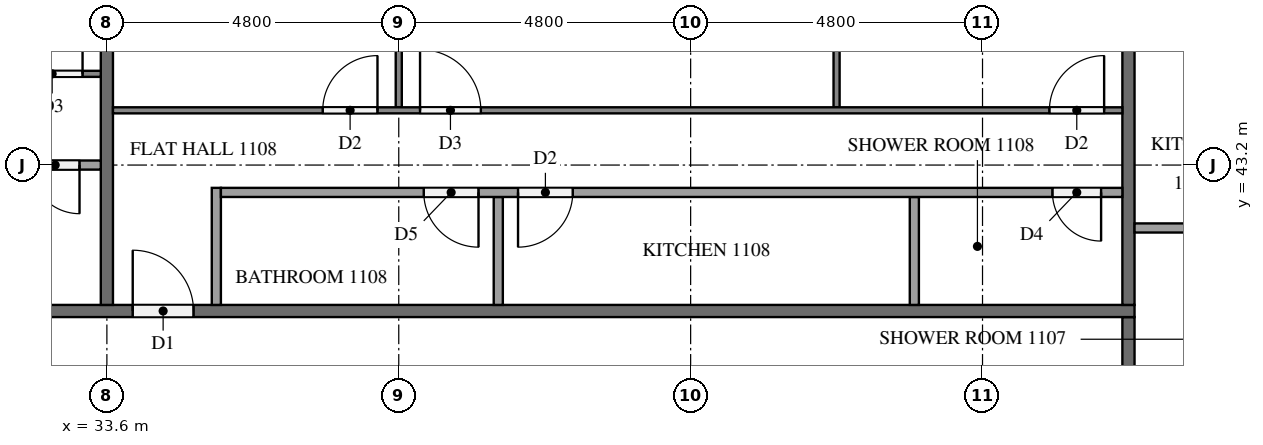
"""IFC4 building model, lengths in metres.
Left out: names, types, materials, properties, quantities, classifications, styles, units other than length and angle.
Written with IfcOpenShell. Run it as: python <this file> out.ifc"""

import sys

from ifc_helpers import new_model, si_unit, direction, frame, frame_2d, origin, place, context, subcontext, project, spatial, rectangle, extrude, element, fill, save


model = new_model("IFC4")
c1 = context("Model", 3, precision=1e-05, world=origin(), true_north=direction((0.0, 1.0)))
c2 = subcontext(c1, "Body", "Model", "MODEL_VIEW")
j1 = project(units=[si_unit("LENGTHUNIT", "METRE"), si_unit("PLANEANGLEUNIT", "RADIAN")], contexts=[c1])
p1 = place(None, origin())
s1 = spatial("IfcSite", under=j1, at=p1, CompositionType="ELEMENT")
p2 = place(p1, origin())
s2 = spatial("IfcBuilding", under=s1, at=p2, CompositionType="ELEMENT")
p3 = place(p2, frame((0.0, 0.0, 46.9)))
s3 = spatial("IfcBuildingStorey", under=s2, at=p3, CompositionType="ELEMENT", Elevation=46.9)
p4 = place(p3, frame((50.4, 40.7, 0.0), z_axis=(0.0, 0.0, 1.0), x_axis=(0.0, -1.0, 0.0)))
e1 = element("IfcWall", 1, at=p4, inside=s3, PredefinedType="PARTITIONING", context=c2, shape_type="SweptSolid", body=[
    extrude(rectangle(XDim=28.6, YDim=0.2, at=frame_2d((14.3, 0.0))), origin(), (0.0, 0.0, 1.0), 3.2),
])
p5 = place(p4, frame((17.125, 0.0, 0.0)))
e2 = element("IfcOpeningElement", 2, at=p5, cuts=e1, PredefinedType="OPENING", context=c2, shape_type="SweptSolid", body=[
    extrude(rectangle(XDim=1.0, YDim=2.1, at=frame_2d((0.5, 1.05))), frame((0.0, 0.11, 0.0), z_axis=(0.0, -1.0, 0.0), x_axis=(1.0, 0.0, 0.0)), (0.0, 0.0, 1.0), 0.22),
])
p6 = place(p4, frame((15.275, 0.0, 0.0)))
e3 = element("IfcOpeningElement", 3, at=p6, cuts=e1, PredefinedType="OPENING", context=c2, shape_type="SweptSolid", body=[
    extrude(rectangle(XDim=1.0, YDim=2.1, at=frame_2d((0.5, 1.05))), frame((0.0, 0.11, 0.0), z_axis=(0.0, -1.0, 0.0), x_axis=(1.0, 0.0, 0.0)), (0.0, 0.0, 1.0), 0.22),
])
p7 = place(p4, frame((5.675, 0.0, 0.0)))
e4 = element("IfcOpeningElement", 4, at=p7, cuts=e1, PredefinedType="OPENING", context=c2, shape_type="SweptSolid", body=[
    extrude(rectangle(XDim=1.0, YDim=2.1, at=frame_2d((0.5, 1.05))), frame((0.0, 0.11, 0.0), z_axis=(0.0, -1.0, 0.0), x_axis=(1.0, 0.0, 0.0)), (0.0, 0.0, 1.0), 0.22),
])
p8 = place(p3, frame((11.9, 40.8, 0.0), z_axis=(0.0, 0.0, 1.0), x_axis=(1.0, 0.0, 0.0)))
e5 = element("IfcWall", 5, at=p8, inside=s3, PredefinedType="PARTITIONING", context=c2, shape_type="SweptSolid", body=[
    extrude(rectangle(XDim=38.6, YDim=0.2, at=frame_2d((19.3, 0.0))), origin(), (0.0, 0.0, 1.0), 3.2),
])
p9 = place(p8, frame((22.125, 0.0, 0.0)))
e6 = element("IfcOpeningElement", 6, at=p9, cuts=e5, PredefinedType="OPENING", context=c2, shape_type="SweptSolid", body=[
    extrude(rectangle(XDim=1.0, YDim=2.1, at=frame_2d((0.5, 1.05))), frame((0.0, 0.11, 0.0), z_axis=(0.0, -1.0, 0.0), x_axis=(1.0, 0.0, 0.0)), (0.0, 0.0, 1.0), 0.22),
])
p10 = place(p8, frame((10.125, 0.0, 0.0)))
e7 = element("IfcOpeningElement", 7, at=p10, cuts=e5, PredefinedType="OPENING", context=c2, shape_type="SweptSolid", body=[
    extrude(rectangle(XDim=1.0, YDim=2.1, at=frame_2d((0.5, 1.05))), frame((0.0, 0.11, 0.0), z_axis=(0.0, -1.0, 0.0), x_axis=(1.0, 0.0, 0.0)), (0.0, 0.0, 1.0), 0.22),
])
p11 = place(p8, frame((8.275, 0.0, 0.0)))
e8 = element("IfcOpeningElement", 8, at=p11, cuts=e5, PredefinedType="OPENING", context=c2, shape_type="SweptSolid", body=[
    extrude(rectangle(XDim=1.0, YDim=2.1, at=frame_2d((0.5, 1.05))), frame((0.0, 0.11, 0.0), z_axis=(0.0, -1.0, 0.0), x_axis=(1.0, 0.0, 0.0)), (0.0, 0.0, 1.0), 0.22),
])
p12 = place(p3, frame((50.4, 40.9, 0.0), z_axis=(0.0, 0.0, 1.0), x_axis=(0.0, 1.0, 0.0)))
e9 = element("IfcWall", 9, at=p12, inside=s3, PredefinedType="PARTITIONING", context=c2, shape_type="SweptSolid", body=[
    extrude(rectangle(XDim=7.0, YDim=0.2, at=frame_2d((3.5, 0.0))), origin(), (0.0, 0.0, 1.0), 3.2),
])
p13 = place(p3, frame((33.6, 47.55, 0.0), z_axis=(0.0, 0.0, 1.0), x_axis=(0.0, -1.0, 0.0)))
e10 = element("IfcWall", 10, at=p13, inside=s3, PredefinedType="PARTITIONING", context=c2, shape_type="SweptSolid", body=[
    extrude(rectangle(XDim=6.65, YDim=0.2, at=frame_2d((3.325, 0.0))), origin(), (0.0, 0.0, 1.0), 3.2),
])
p14 = place(p3, frame((50.5, 42.165, 0.0), z_axis=(0.0, 0.0, 1.0), x_axis=(1.0, 0.0, 0.0)))
e11 = element("IfcWall", 11, at=p14, inside=s3, PredefinedType="PARTITIONING", context=c2, shape_type="SweptSolid", body=[
    extrude(rectangle(XDim=1.925, YDim=0.15, at=frame_2d((0.962, 0.0))), origin(), (0.0, 0.0, 1.0), 3.2),
])
for number, where, z_axis, x_axis in (
    (12, (38.4, 44.15, 0.0), (0.0, 0.0, 1.0), (0.0, 1.0, 0.0)),
    (13, (45.6, 44.15, 0.0), (0.0, 0.0, 1.0), (0.0, 1.0, 0.0)),
):
    element("IfcWall", number, at=place(p3, frame(where, z_axis=z_axis, x_axis=x_axis)), inside=s3, PredefinedType="PARTITIONING", context=c2, shape_type="SweptSolid", body=[
        extrude(rectangle(XDim=3.75, YDim=0.1, at=frame_2d((1.875, 0.0))), origin(), (0.0, 0.0, 1.0), 3.2),
    ])
p15 = place(p3, frame((33.7, 44.1, 0.0), z_axis=(0.0, 0.0, 1.0), x_axis=(1.0, 0.0, 0.0)))
e14 = element("IfcWall", 14, at=p15, inside=s3, PredefinedType="PARTITIONING", context=c2, shape_type="SweptSolid", body=[
    extrude(rectangle(XDim=16.6, YDim=0.1, at=frame_2d((8.3, 0.0))), origin(), (0.0, 0.0, 1.0), 3.2),
])
p16 = place(p15, frame((3.45, 0.0, 0.0)))
e15 = element("IfcOpeningElement", 15, at=p16, cuts=e14, PredefinedType="OPENING", context=c2, shape_type="SweptSolid", body=[
    extrude(rectangle(XDim=0.9, YDim=2.1, at=frame_2d((0.45, 1.05))), frame((0.0, 0.06, 0.0), z_axis=(0.0, -1.0, 0.0), x_axis=(1.0, 0.0, 0.0)), (0.0, 0.0, 1.0), 0.12),
])
p17 = place(p15, frame((5.05, 0.0, 0.0)))
e16 = element("IfcOpeningElement", 16, at=p17, cuts=e14, PredefinedType="OPENING", context=c2, shape_type="SweptSolid", body=[
    extrude(rectangle(XDim=1.0, YDim=2.1, at=frame_2d((0.5, 1.05))), frame((0.0, 0.06, 0.0), z_axis=(0.0, -1.0, 0.0), x_axis=(1.0, 0.0, 0.0)), (0.0, 0.0, 1.0), 0.12),
])
p18 = place(p15, frame((15.4, 0.0, 0.0)))
e17 = element("IfcOpeningElement", 17, at=p18, cuts=e14, PredefinedType="OPENING", context=c2, shape_type="SweptSolid", body=[
    extrude(rectangle(XDim=0.9, YDim=2.1, at=frame_2d((0.45, 1.05))), frame((0.0, 0.06, 0.0), z_axis=(0.0, -1.0, 0.0), x_axis=(1.0, 0.0, 0.0)), (0.0, 0.0, 1.0), 0.12),
])
for number, where, z_axis, x_axis in (
    (18, (40.037, 40.9, 0.0), (0.0, 0.0, 1.0), (0.0, 1.0, 0.0)),
    (19, (46.879, 40.9, 0.0), (0.0, 0.0, 1.0), (0.0, 1.0, 0.0)),
):
    element("IfcWall", number, at=place(p3, frame(where, z_axis=z_axis, x_axis=x_axis)), inside=s3, PredefinedType="PARTITIONING", context=c2, shape_type="SweptSolid", body=[
        extrude(rectangle(XDim=1.775, YDim=0.15, at=frame_2d((0.888, 0.0))), origin(), (0.0, 0.0, 1.0), 3.2),
    ])
p19 = place(p3, frame((35.4, 40.9, 0.0), z_axis=(0.0, 0.0, 1.0), x_axis=(0.0, 1.0, 0.0)))
e20 = element("IfcWall", 20, at=p19, inside=s3, PredefinedType="PARTITIONING", context=c2, shape_type="SweptSolid", body=[
    extrude(rectangle(XDim=1.925, YDim=0.15, at=frame_2d((0.962, 0.0))), origin(), (0.0, 0.0, 1.0), 3.2),
])
p20 = place(p3, frame((50.3, 42.75, 0.0), z_axis=(0.0, 0.0, 1.0), x_axis=(-1.0, 0.0, 0.0)))
e21 = element("IfcWall", 21, at=p20, inside=s3, PredefinedType="PARTITIONING", context=c2, shape_type="SweptSolid", body=[
    extrude(rectangle(XDim=14.825, YDim=0.15, at=frame_2d((7.413, 0.0))), origin(), (0.0, 0.0, 1.0), 3.2),
])
p21 = place(p20, frame((10.588, 0.0, 0.0)))
e22 = element("IfcOpeningElement", 22, at=p21, cuts=e21, PredefinedType="OPENING", context=c2, shape_type="SweptSolid", body=[
    extrude(rectangle(XDim=0.9, YDim=2.1, at=frame_2d((0.45, 1.05))), frame((0.0, 0.085, 0.0), z_axis=(0.0, -1.0, 0.0), x_axis=(1.0, 0.0, 0.0)), (0.0, 0.0, 1.0), 0.17),
])
p22 = place(p20, frame((9.039, 0.0, 0.0)))
e23 = element("IfcOpeningElement", 23, at=p22, cuts=e21, PredefinedType="OPENING", context=c2, shape_type="SweptSolid", body=[
    extrude(rectangle(XDim=0.9, YDim=2.1, at=frame_2d((0.45, 1.05))), frame((0.0, 0.085, 0.0), z_axis=(0.0, -1.0, 0.0), x_axis=(1.0, 0.0, 0.0)), (0.0, 0.0, 1.0), 0.17),
])
p23 = place(p20, frame((0.35, 0.0, 0.0)))
e24 = element("IfcOpeningElement", 24, at=p23, cuts=e21, PredefinedType="OPENING", context=c2, shape_type="SweptSolid", body=[
    extrude(rectangle(XDim=0.8, YDim=2.1, at=frame_2d((0.4, 1.05))), frame((0.0, 0.085, 0.0), z_axis=(0.0, -1.0, 0.0), x_axis=(1.0, 0.0, 0.0)), (0.0, 0.0, 1.0), 0.17),
])
p24 = place(p3, frame((21.7, 44.7, 0.0), z_axis=(0.0, 0.0, 1.0), x_axis=(1.0, 0.0, 0.0)))
e25 = element("IfcWall", 25, at=p24, inside=s3, PredefinedType="PARTITIONING", context=c2, shape_type="SweptSolid", body=[
    extrude(rectangle(XDim=11.8, YDim=0.1, at=frame_2d((5.9, 0.0))), origin(), (0.0, 0.0, 1.0), 3.2),
])
p25 = place(p24, frame((0.3, 0.0, 0.0)))
e26 = element("IfcOpeningElement", 26, at=p25, cuts=e25, PredefinedType="OPENING", context=c2, shape_type="SweptSolid", body=[
    extrude(rectangle(XDim=0.9, YDim=2.1, at=frame_2d((0.45, 1.05))), frame((0.0, 0.06, 0.0), z_axis=(0.0, -1.0, 0.0), x_axis=(1.0, 0.0, 0.0)), (0.0, 0.0, 1.0), 0.12),
])
p26 = place(p24, frame((10.5, 0.0, 0.0)))
e27 = element("IfcOpeningElement", 27, at=p26, cuts=e25, PredefinedType="OPENING", context=c2, shape_type="SweptSolid", body=[
    extrude(rectangle(XDim=1.0, YDim=2.1, at=frame_2d((0.5, 1.05))), frame((0.0, 0.06, 0.0), z_axis=(0.0, -1.0, 0.0), x_axis=(1.0, 0.0, 0.0)), (0.0, 0.0, 1.0), 0.12),
])
p27 = place(p3, frame((33.5, 43.2, 0.0), z_axis=(0.0, 0.0, 1.0), x_axis=(-1.0, 0.0, 0.0)))
e28 = element("IfcWall", 28, at=p27, inside=s3, PredefinedType="PARTITIONING", context=c2, shape_type="SweptSolid", body=[
    extrude(rectangle(XDim=10.025, YDim=0.15, at=frame_2d((5.012, 0.0))), origin(), (0.0, 0.0, 1.0), 3.2),
])
p28 = place(p27, frame((8.825, 0.0, 0.0)))
e29 = element("IfcOpeningElement", 29, at=p28, cuts=e28, PredefinedType="OPENING", context=c2, shape_type="SweptSolid", body=[
    extrude(rectangle(XDim=0.9, YDim=2.1, at=frame_2d((0.45, 1.05))), frame((0.0, 0.085, 0.0), z_axis=(0.0, -1.0, 0.0), x_axis=(1.0, 0.0, 0.0)), (0.0, 0.0, 1.0), 0.17),
])
p29 = place(p27, frame((0.35, 0.0, 0.0)))
e30 = element("IfcOpeningElement", 30, at=p29, cuts=e28, PredefinedType="OPENING", context=c2, shape_type="SweptSolid", body=[
    extrude(rectangle(XDim=0.8, YDim=2.1, at=frame_2d((0.4, 1.05))), frame((0.0, 0.085, 0.0), z_axis=(0.0, -1.0, 0.0), x_axis=(1.0, 0.0, 0.0)), (0.0, 0.0, 1.0), 0.17),
])
p30 = place(p9, origin())
e31 = element("IfcDoor", 31, at=p30, inside=s3, OperationType="SINGLE_SWING_LEFT", PredefinedType="DOOR", context=c2, shape_type="SweptSolid", body=[
    extrude(rectangle(XDim=1.0, YDim=2.1, at=frame_2d((0.5, 1.05))), frame((0.0, 0.025, 0.0), z_axis=(0.0, -1.0, 0.0), x_axis=(1.0, 0.0, 0.0)), (0.0, 0.0, 1.0), 0.05),
])
fill(e6, e31)
p31 = place(p16, origin())
e32 = element("IfcDoor", 32, at=p31, inside=s3, OperationType="SINGLE_SWING_RIGHT", PredefinedType="DOOR", context=c2, shape_type="SweptSolid", body=[
    extrude(rectangle(XDim=0.9, YDim=2.1, at=frame_2d((0.45, 1.05))), frame((0.0, 0.025, 0.0), z_axis=(0.0, -1.0, 0.0), x_axis=(1.0, 0.0, 0.0)), (0.0, 0.0, 1.0), 0.05),
])
fill(e15, e32)
p32 = place(p17, origin())
e33 = element("IfcDoor", 33, at=p32, inside=s3, OperationType="SINGLE_SWING_LEFT", PredefinedType="DOOR", context=c2, shape_type="SweptSolid", body=[
    extrude(rectangle(XDim=1.0, YDim=2.1, at=frame_2d((0.5, 1.05))), frame((0.0, 0.025, 0.0), z_axis=(0.0, -1.0, 0.0), x_axis=(1.0, 0.0, 0.0)), (0.0, 0.0, 1.0), 0.05),
])
fill(e16, e33)
p33 = place(p18, origin())
e34 = element("IfcDoor", 34, at=p33, inside=s3, OperationType="SINGLE_SWING_RIGHT", PredefinedType="DOOR", context=c2, shape_type="SweptSolid", body=[
    extrude(rectangle(XDim=0.9, YDim=2.1, at=frame_2d((0.45, 1.05))), frame((0.0, 0.025, 0.0), z_axis=(0.0, -1.0, 0.0), x_axis=(1.0, 0.0, 0.0)), (0.0, 0.0, 1.0), 0.05),
])
fill(e17, e34)
p34 = place(p21, origin())
e35 = element("IfcDoor", 35, at=p34, inside=s3, OperationType="SINGLE_SWING_LEFT", PredefinedType="DOOR", context=c2, shape_type="SweptSolid", body=[
    extrude(rectangle(XDim=0.9, YDim=2.1, at=frame_2d((0.45, 1.05))), frame((0.0, 0.025, 0.0), z_axis=(0.0, -1.0, 0.0), x_axis=(1.0, 0.0, 0.0)), (0.0, 0.0, 1.0), 0.05),
])
fill(e22, e35)
p35 = place(p22, origin())
e36 = element("IfcDoor", 36, at=p35, inside=s3, OperationType="SINGLE_SWING_RIGHT", PredefinedType="DOOR", context=c2, shape_type="SweptSolid", body=[
    extrude(rectangle(XDim=0.9, YDim=2.1, at=frame_2d((0.45, 1.05))), frame((0.0, 0.025, 0.0), z_axis=(0.0, -1.0, 0.0), x_axis=(1.0, 0.0, 0.0)), (0.0, 0.0, 1.0), 0.05),
])
fill(e23, e36)
p36 = place(p23, origin())
e37 = element("IfcDoor", 37, at=p36, inside=s3, OperationType="SINGLE_SWING_LEFT", PredefinedType="DOOR", context=c2, shape_type="SweptSolid", body=[
    extrude(rectangle(XDim=0.8, YDim=2.1, at=frame_2d((0.4, 1.05))), frame((0.0, 0.025, 0.0), z_axis=(0.0, -1.0, 0.0), x_axis=(1.0, 0.0, 0.0)), (0.0, 0.0, 1.0), 0.05),
])
fill(e24, e37)
p37 = place(p26, origin())
e38 = element("IfcDoor", 38, at=p37, inside=s3, OperationType="SINGLE_SWING_RIGHT", PredefinedType="DOOR", context=c2, shape_type="SweptSolid", body=[
    extrude(rectangle(XDim=1.0, YDim=2.1, at=frame_2d((0.5, 1.05))), frame((0.0, 0.025, 0.0), z_axis=(0.0, -1.0, 0.0), x_axis=(1.0, 0.0, 0.0)), (0.0, 0.0, 1.0), 0.05),
])
fill(e27, e38)
p38 = place(p29, origin())
e39 = element("IfcDoor", 39, at=p38, inside=s3, OperationType="SINGLE_SWING_LEFT", PredefinedType="DOOR", context=c2, shape_type="SweptSolid", body=[
    extrude(rectangle(XDim=0.8, YDim=2.1, at=frame_2d((0.4, 1.05))), frame((0.0, 0.025, 0.0), z_axis=(0.0, -1.0, 0.0), x_axis=(1.0, 0.0, 0.0)), (0.0, 0.0, 1.0), 0.05),
])
fill(e30, e39)
save(model, sys.argv[1])
